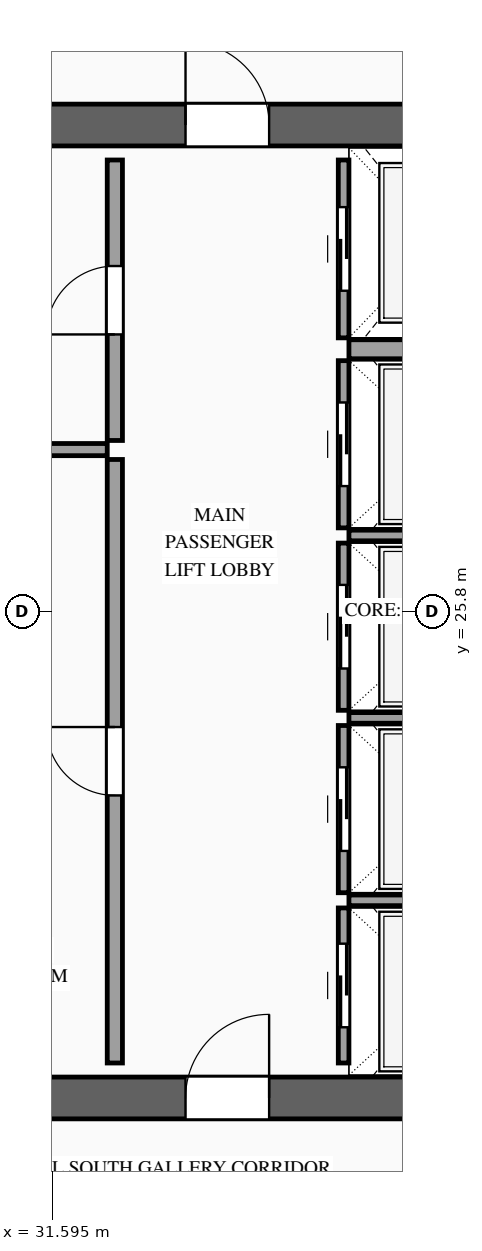
"""IFC4 building model, lengths in metres.
Left out: names, types, materials, properties, quantities, classifications, styles, units other than length and angle.
Written with IfcOpenShell. Run it as: python <this file> out.ifc"""

import sys

from ifc_helpers import new_model, si_unit, direction, frame, frame_2d, origin, place, context, subcontext, project, spatial, rectangle, extrude, source, transform, mapped, element, fill, save


model = new_model("IFC4")
c1 = context("Model", 3, precision=1e-05, world=origin(), true_north=direction((0.0, 1.0)))
c2 = subcontext(c1, "Body", "Model", "MODEL_VIEW")
j1 = project(units=[si_unit("LENGTHUNIT", "METRE"), si_unit("PLANEANGLEUNIT", "RADIAN")], contexts=[c1])
p1 = place(None, origin())
s1 = spatial("IfcSite", under=j1, at=p1, CompositionType="ELEMENT")
p2 = place(p1, origin())
s2 = spatial("IfcBuilding", under=s1, at=p2, CompositionType="ELEMENT")
p3 = place(p2, frame((0.0, 0.0, 234.6)))
s3 = spatial("IfcBuildingStorey", under=s2, at=p3, CompositionType="ELEMENT", Elevation=234.6)
p4 = place(p3, frame((23.525, 19.4, 0.0), z_axis=(0.0, 0.0, 1.0), x_axis=(1.0, 0.0, 0.0)))
e1 = element("IfcWall", 1, at=p4, inside=s3, PredefinedType="SHEAR", context=c2, shape_type="SweptSolid", body=[
    extrude(rectangle(XDim=26.95, YDim=0.55, at=frame_2d((13.475, 0.0))), origin(), (0.0, 0.0, 1.0), 3.5),
])
p5 = place(p4, frame((1.925, 0.0, 0.0)))
e2 = element("IfcOpeningElement", 2, at=p5, cuts=e1, PredefinedType="OPENING", context=c2, shape_type="SweptSolid", body=[
    extrude(rectangle(XDim=1.1, YDim=2.2, at=frame_2d((0.55, 1.1))), frame((0.0, 0.29, 0.0), z_axis=(0.0, -1.0, 0.0), x_axis=(1.0, 0.0, 0.0)), (0.0, 0.0, 1.0), 0.58),
])
p6 = place(p4, frame((9.825, 0.0, 0.0)))
e3 = element("IfcOpeningElement", 3, at=p6, cuts=e1, PredefinedType="OPENING", context=c2, shape_type="SweptSolid", body=[
    extrude(rectangle(XDim=1.1, YDim=2.2, at=frame_2d((0.55, 1.1))), frame((0.0, 0.29, 0.0), z_axis=(0.0, -1.0, 0.0), x_axis=(1.0, 0.0, 0.0)), (0.0, 0.0, 1.0), 0.58),
])
p7 = place(p4, frame((23.025, 0.0, 0.0)))
e4 = element("IfcOpeningElement", 4, at=p7, cuts=e1, PredefinedType="OPENING", context=c2, shape_type="SweptSolid", body=[
    extrude(rectangle(XDim=1.1, YDim=2.2, at=frame_2d((0.55, 1.1))), frame((0.0, 0.29, 0.0), z_axis=(0.0, -1.0, 0.0), x_axis=(1.0, 0.0, 0.0)), (0.0, 0.0, 1.0), 0.58),
])
p8 = place(p4, frame((19.645, 0.0, 0.0)))
e5 = element("IfcOpeningElement", 5, at=p8, cuts=e1, PredefinedType="OPENING", context=c2, shape_type="SweptSolid", body=[
    extrude(rectangle(XDim=0.9, YDim=2.15, at=frame_2d((0.45, 1.075))), frame((0.0, 0.29, 0.0), z_axis=(0.0, -1.0, 0.0), x_axis=(1.0, 0.0, 0.0)), (0.0, 0.0, 1.0), 0.58),
])
p9 = place(p4, frame((18.205, 0.0, 0.0)))
e6 = element("IfcOpeningElement", 6, at=p9, cuts=e1, PredefinedType="OPENING", context=c2, shape_type="SweptSolid", body=[
    extrude(rectangle(XDim=0.9, YDim=2.15, at=frame_2d((0.45, 1.075))), frame((0.0, 0.29, 0.0), z_axis=(0.0, -1.0, 0.0), x_axis=(1.0, 0.0, 0.0)), (0.0, 0.0, 1.0), 0.58),
])
p10 = place(p3, frame((23.525, 32.2, 0.0), z_axis=(0.0, 0.0, 1.0), x_axis=(1.0, 0.0, 0.0)))
e7 = element("IfcWall", 7, at=p10, inside=s3, PredefinedType="SHEAR", context=c2, shape_type="SweptSolid", body=[
    extrude(rectangle(XDim=26.95, YDim=0.55, at=frame_2d((13.475, 0.0))), origin(), (0.0, 0.0, 1.0), 3.5),
])
p11 = place(p10, frame((4.545, 0.0, 0.0)))
e8 = element("IfcOpeningElement", 8, at=p11, cuts=e7, PredefinedType="OPENING", context=c2, shape_type="SweptSolid", body=[
    extrude(rectangle(XDim=0.9, YDim=2.15, at=frame_2d((0.45, 1.075))), frame((0.0, 0.29, 0.0), z_axis=(0.0, -1.0, 0.0), x_axis=(1.0, 0.0, 0.0)), (0.0, 0.0, 1.0), 0.58),
])
p12 = place(p10, frame((9.825, 0.0, 0.0)))
e9 = element("IfcOpeningElement", 9, at=p12, cuts=e7, PredefinedType="OPENING", context=c2, shape_type="SweptSolid", body=[
    extrude(rectangle(XDim=1.1, YDim=2.2, at=frame_2d((0.55, 1.1))), frame((0.0, 0.29, 0.0), z_axis=(0.0, -1.0, 0.0), x_axis=(1.0, 0.0, 0.0)), (0.0, 0.0, 1.0), 0.58),
])
p13 = place(p10, frame((15.675, 0.0, 0.0)))
e10 = element("IfcOpeningElement", 10, at=p13, cuts=e7, PredefinedType="OPENING", context=c2, shape_type="SweptSolid", body=[
    extrude(rectangle(XDim=1.1, YDim=2.2, at=frame_2d((0.55, 1.1))), frame((0.0, 0.29, 0.0), z_axis=(0.0, -1.0, 0.0), x_axis=(1.0, 0.0, 0.0)), (0.0, 0.0, 1.0), 0.58),
])
p14 = place(p10, frame((18.205, 0.0, 0.0)))
e11 = element("IfcOpeningElement", 11, at=p14, cuts=e7, PredefinedType="OPENING", context=c2, shape_type="SweptSolid", body=[
    extrude(rectangle(XDim=0.9, YDim=2.15, at=frame_2d((0.45, 1.075))), frame((0.0, 0.29, 0.0), z_axis=(0.0, -1.0, 0.0), x_axis=(1.0, 0.0, 0.0)), (0.0, 0.0, 1.0), 0.58),
])
p15 = place(p10, frame((19.645, 0.0, 0.0)))
e12 = element("IfcOpeningElement", 12, at=p15, cuts=e7, PredefinedType="OPENING", context=c2, shape_type="SweptSolid", body=[
    extrude(rectangle(XDim=0.9, YDim=2.15, at=frame_2d((0.45, 1.075))), frame((0.0, 0.29, 0.0), z_axis=(0.0, -1.0, 0.0), x_axis=(1.0, 0.0, 0.0)), (0.0, 0.0, 1.0), 0.58),
])
p16 = place(p3, frame((35.43, 19.86, 0.0), z_axis=(0.0, 0.0, 1.0), x_axis=(0.0, 1.0, 0.0)))
e13 = element("IfcWall", 13, at=p16, inside=s3, PredefinedType="SOLIDWALL", context=c2, shape_type="SweptSolid", body=[
    extrude(rectangle(XDim=2.04, YDim=0.14, at=frame_2d((1.02, 0.0))), origin(), (0.0, 0.0, 1.0), 3.28),
])
p17 = place(p16, frame((0.47, 0.0, 0.0)))
e14 = element("IfcOpeningElement", 14, at=p17, cuts=e13, PredefinedType="OPENING", context=c2, shape_type="SweptSolid", body=[
    extrude(rectangle(XDim=1.1, YDim=2.2, at=frame_2d((0.55, 1.1))), frame((0.0, 0.085, 0.0), z_axis=(0.0, -1.0, 0.0), x_axis=(1.0, 0.0, 0.0)), (0.0, 0.0, 1.0), 0.17),
])
m1 = source(origin(), c2, "Body", "SweptSolid", [
    extrude(rectangle(XDim=2.4, YDim=0.14, at=frame_2d((1.2, 0.0))), origin(), (0.0, 0.0, 1.0), 3.28),
])
p18 = place(p3, frame((35.5, 22.0, 0.0), z_axis=(0.0, 0.0, 1.0), x_axis=(1.0, 0.0, 0.0)))
e15 = element("IfcWall", 15, at=p18, inside=s3, PredefinedType="SOLIDWALL", context=c2, shape_type="MappedRepresentation", body=[
    mapped(m1, transform((0.0, 0.0, 0.0), scale=1.0)),
])
p19 = place(p3, frame((35.43, 22.1, 0.0), z_axis=(0.0, 0.0, 1.0), x_axis=(0.0, 1.0, 0.0)))
e16 = element("IfcWall", 16, at=p19, inside=s3, PredefinedType="SOLIDWALL", context=c2, shape_type="SweptSolid", body=[
    extrude(rectangle(XDim=2.2, YDim=0.14, at=frame_2d((1.1, 0.0))), origin(), (0.0, 0.0, 1.0), 3.28),
])
p20 = place(p19, frame((0.55, 0.0, 0.0)))
e17 = element("IfcOpeningElement", 17, at=p20, cuts=e16, PredefinedType="OPENING", context=c2, shape_type="SweptSolid", body=[
    extrude(rectangle(XDim=1.1, YDim=2.2, at=frame_2d((0.55, 1.1))), frame((0.0, 0.085, 0.0), z_axis=(0.0, -1.0, 0.0), x_axis=(1.0, 0.0, 0.0)), (0.0, 0.0, 1.0), 0.17),
])
p21 = place(p3, frame((35.5, 24.4, 0.0), z_axis=(0.0, 0.0, 1.0), x_axis=(1.0, 0.0, 0.0)))
e18 = element("IfcWall", 18, at=p21, inside=s3, PredefinedType="SOLIDWALL", context=c2, shape_type="MappedRepresentation", body=[
    mapped(m1, transform((0.0, 0.0, 0.0), scale=1.0)),
])
p22 = place(p3, frame((35.43, 24.5, 0.0), z_axis=(0.0, 0.0, 1.0), x_axis=(0.0, 1.0, 0.0)))
e19 = element("IfcWall", 19, at=p22, inside=s3, PredefinedType="SOLIDWALL", context=c2, shape_type="SweptSolid", body=[
    extrude(rectangle(XDim=2.2, YDim=0.14, at=frame_2d((1.1, 0.0))), origin(), (0.0, 0.0, 1.0), 3.28),
])
p23 = place(p22, frame((0.55, 0.0, 0.0)))
e20 = element("IfcOpeningElement", 20, at=p23, cuts=e19, PredefinedType="OPENING", context=c2, shape_type="SweptSolid", body=[
    extrude(rectangle(XDim=1.1, YDim=2.2, at=frame_2d((0.55, 1.1))), frame((0.0, 0.085, 0.0), z_axis=(0.0, -1.0, 0.0), x_axis=(1.0, 0.0, 0.0)), (0.0, 0.0, 1.0), 0.17),
])
p24 = place(p3, frame((35.5, 26.8, 0.0), z_axis=(0.0, 0.0, 1.0), x_axis=(1.0, 0.0, 0.0)))
e21 = element("IfcWall", 21, at=p24, inside=s3, PredefinedType="SOLIDWALL", context=c2, shape_type="MappedRepresentation", body=[
    mapped(m1, transform((0.0, 0.0, 0.0), scale=1.0)),
])
p25 = place(p3, frame((35.43, 26.9, 0.0), z_axis=(0.0, 0.0, 1.0), x_axis=(0.0, 1.0, 0.0)))
e22 = element("IfcWall", 22, at=p25, inside=s3, PredefinedType="SOLIDWALL", context=c2, shape_type="SweptSolid", body=[
    extrude(rectangle(XDim=2.2, YDim=0.14, at=frame_2d((1.1, 0.0))), origin(), (0.0, 0.0, 1.0), 3.28),
])
p26 = place(p25, frame((0.55, 0.0, 0.0)))
e23 = element("IfcOpeningElement", 23, at=p26, cuts=e22, PredefinedType="OPENING", context=c2, shape_type="SweptSolid", body=[
    extrude(rectangle(XDim=1.1, YDim=2.2, at=frame_2d((0.55, 1.1))), frame((0.0, 0.085, 0.0), z_axis=(0.0, -1.0, 0.0), x_axis=(1.0, 0.0, 0.0)), (0.0, 0.0, 1.0), 0.17),
])
p27 = place(p3, frame((35.43, 29.4, 0.0), z_axis=(0.0, 0.0, 1.0), x_axis=(0.0, 1.0, 0.0)))
e24 = element("IfcWall", 24, at=p27, inside=s3, PredefinedType="SOLIDWALL", context=c2, shape_type="SweptSolid", body=[
    extrude(rectangle(XDim=2.34, YDim=0.14, at=frame_2d((1.17, 0.0))), origin(), (0.0, 0.0, 1.0), 3.28),
])
p28 = place(p27, frame((0.62, 0.0, 0.0)))
e25 = element("IfcOpeningElement", 25, at=p28, cuts=e24, PredefinedType="OPENING", context=c2, shape_type="SweptSolid", body=[
    extrude(rectangle(XDim=1.1, YDim=2.2, at=frame_2d((0.55, 1.1))), frame((0.0, 0.085, 0.0), z_axis=(0.0, -1.0, 0.0), x_axis=(1.0, 0.0, 0.0)), (0.0, 0.0, 1.0), 0.17),
])
m2 = source(origin(), c2, "Body", "SweptSolid", [
    extrude(rectangle(XDim=2.4, YDim=0.25, at=frame_2d((1.2, 0.0))), origin(), (0.0, 0.0, 1.0), 3.28),
])
p29 = place(p3, frame((35.5, 29.25, 0.0), z_axis=(0.0, 0.0, 1.0), x_axis=(1.0, 0.0, 0.0)))
e26 = element("IfcWall", 26, at=p29, inside=s3, PredefinedType="SOLIDWALL", context=c2, shape_type="MappedRepresentation", body=[
    mapped(m2, transform((0.0, 0.0, 0.0), scale=1.0)),
])
p30 = place(p3, frame((32.42, 19.86, 0.0), z_axis=(0.0, 0.0, 1.0), x_axis=(0.0, 1.0, 0.0)))
e27 = element("IfcWall", 27, at=p30, inside=s3, PredefinedType="PARTITIONING", context=c2, shape_type="SweptSolid", body=[
    extrude(rectangle(XDim=7.94, YDim=0.2, at=frame_2d((3.97, 0.0))), origin(), (0.0, 0.0, 1.0), 3.28),
])
p31 = place(p30, frame((3.52, 0.0, 0.0)))
e28 = element("IfcOpeningElement", 28, at=p31, cuts=e27, PredefinedType="OPENING", context=c2, shape_type="SweptSolid", body=[
    extrude(rectangle(XDim=0.9, YDim=2.15, at=frame_2d((0.45, 1.075))), frame((0.0, 0.115, 0.0), z_axis=(0.0, -1.0, 0.0), x_axis=(1.0, 0.0, 0.0)), (0.0, 0.0, 1.0), 0.23),
])
p32 = place(p3, frame((32.42, 28.05, 0.0), z_axis=(0.0, 0.0, 1.0), x_axis=(0.0, 1.0, 0.0)))
e29 = element("IfcWall", 29, at=p32, inside=s3, PredefinedType="PARTITIONING", context=c2, shape_type="SweptSolid", body=[
    extrude(rectangle(XDim=3.69, YDim=0.2, at=frame_2d((1.845, 0.0))), origin(), (0.0, 0.0, 1.0), 3.28),
])
p33 = place(p32, frame((1.395, 0.0, 0.0)))
e30 = element("IfcOpeningElement", 30, at=p33, cuts=e29, PredefinedType="OPENING", context=c2, shape_type="SweptSolid", body=[
    extrude(rectangle(XDim=0.9, YDim=2.15, at=frame_2d((0.45, 1.075))), frame((0.0, 0.115, 0.0), z_axis=(0.0, -1.0, 0.0), x_axis=(1.0, 0.0, 0.0)), (0.0, 0.0, 1.0), 0.23),
])
m3 = source(origin(), c2, "Body", "SweptSolid", [
    extrude(rectangle(XDim=2.47, YDim=0.16, at=frame_2d((1.235, 0.0))), origin(), (0.0, 0.0, 1.0), 3.28),
])
p34 = place(p3, frame((29.85, 27.93, 0.0), z_axis=(0.0, 0.0, 1.0), x_axis=(1.0, 0.0, 0.0)))
e31 = element("IfcWall", 31, at=p34, inside=s3, PredefinedType="PARTITIONING", context=c2, shape_type="MappedRepresentation", body=[
    mapped(m3, transform((0.0, 0.0, 0.0), scale=1.0)),
])
m4 = source(origin(), c2, "Body", "SweptSolid", [
    extrude(rectangle(XDim=1.1, YDim=2.2, at=frame_2d((0.55, 1.1))), frame((0.0, 0.025, 0.0), z_axis=(0.0, -1.0, 0.0), x_axis=(1.0, 0.0, 0.0)), (0.0, 0.0, 1.0), 0.05),
])
p35 = place(p17, origin())
e32 = element("IfcDoor", 32, at=p35, inside=s3, OperationType="SLIDING_TO_RIGHT", PredefinedType="DOOR", context=c2, shape_type="MappedRepresentation", body=[
    mapped(m4, transform((0.0, 0.0, 0.0), scale=1.0)),
])
fill(e14, e32)
p36 = place(p20, origin())
e33 = element("IfcDoor", 33, at=p36, inside=s3, OperationType="SLIDING_TO_LEFT", PredefinedType="DOOR", context=c2, shape_type="MappedRepresentation", body=[
    mapped(m4, transform((0.0, 0.0, 0.0), scale=1.0)),
])
fill(e17, e33)
p37 = place(p23, origin())
e34 = element("IfcDoor", 34, at=p37, inside=s3, OperationType="SLIDING_TO_RIGHT", PredefinedType="DOOR", context=c2, shape_type="MappedRepresentation", body=[
    mapped(m4, transform((0.0, 0.0, 0.0), scale=1.0)),
])
fill(e20, e34)
p38 = place(p26, origin())
e35 = element("IfcDoor", 35, at=p38, inside=s3, OperationType="SLIDING_TO_LEFT", PredefinedType="DOOR", context=c2, shape_type="MappedRepresentation", body=[
    mapped(m4, transform((0.0, 0.0, 0.0), scale=1.0)),
])
fill(e23, e35)
p39 = place(p28, origin())
e36 = element("IfcDoor", 36, at=p39, inside=s3, OperationType="SLIDING_TO_RIGHT", PredefinedType="DOOR", context=c2, shape_type="MappedRepresentation", body=[
    mapped(m4, transform((0.0, 0.0, 0.0), scale=1.0)),
])
fill(e25, e36)
m5 = source(origin(), c2, "Body", "SweptSolid", [
    extrude(rectangle(XDim=1.1, YDim=2.2, at=frame_2d((0.55, 1.1))), frame((0.0, 0.025, 0.0), z_axis=(0.0, -1.0, 0.0), x_axis=(1.0, 0.0, 0.0)), (0.0, 0.0, 1.0), 0.05),
])
p40 = place(p6, origin())
e37 = element("IfcDoor", 37, at=p40, inside=s3, OperationType="SINGLE_SWING_RIGHT", PredefinedType="DOOR", context=c2, shape_type="MappedRepresentation", body=[
    mapped(m5, transform((0.0, 0.0, 0.0), scale=1.0)),
])
fill(e3, e37)
p41 = place(p12, origin())
e38 = element("IfcDoor", 38, at=p41, inside=s3, OperationType="SINGLE_SWING_LEFT", PredefinedType="DOOR", context=c2, shape_type="MappedRepresentation", body=[
    mapped(m5, transform((0.0, 0.0, 0.0), scale=1.0)),
])
fill(e9, e38)
m6 = source(origin(), c2, "Body", "SweptSolid", [
    extrude(rectangle(XDim=0.9, YDim=2.15, at=frame_2d((0.45, 1.075))), frame((0.0, 0.025, 0.0), z_axis=(0.0, -1.0, 0.0), x_axis=(1.0, 0.0, 0.0)), (0.0, 0.0, 1.0), 0.05),
])
p42 = place(p31, origin())
e39 = element("IfcDoor", 39, at=p42, inside=s3, OperationType="SINGLE_SWING_RIGHT", PredefinedType="DOOR", context=c2, shape_type="MappedRepresentation", body=[
    mapped(m6, transform((0.0, 0.0, 0.0), scale=1.0)),
])
fill(e28, e39)
p43 = place(p33, origin())
e40 = element("IfcDoor", 40, at=p43, inside=s3, OperationType="SINGLE_SWING_LEFT", PredefinedType="DOOR", context=c2, shape_type="MappedRepresentation", body=[
    mapped(m6, transform((0.0, 0.0, 0.0), scale=1.0)),
])
fill(e30, e40)
save(model, sys.argv[1])
